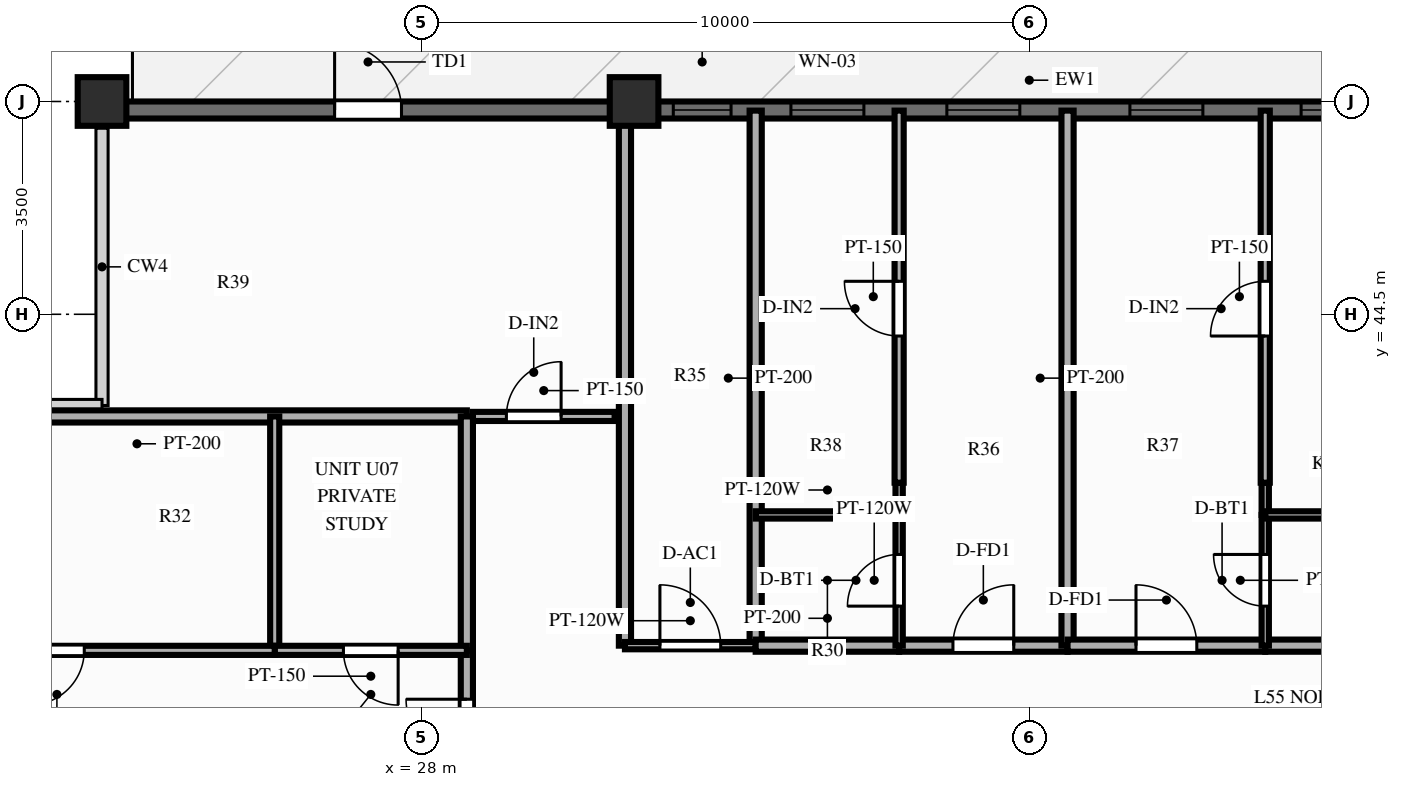
"""IFC4 building model, lengths in metres.
Left out: names, types, materials, properties, quantities, classifications, styles, units other than length and angle.
Written with IfcOpenShell. Run it as: python <this file> out.ifc"""

import sys

from ifc_helpers import new_model, si_unit, direction, frame, frame_2d, origin, origin_2d, place, context, subcontext, project, spatial, rectangle, extrude, source, transform, mapped, element, fill, save


model = new_model("IFC4")
c1 = context("Model", 3, precision=1e-05, world=origin(), true_north=direction((0.0, 1.0)))
c2 = subcontext(c1, "Body", "Model", "MODEL_VIEW")
j1 = project(units=[si_unit("LENGTHUNIT", "METRE"), si_unit("PLANEANGLEUNIT", "RADIAN")], contexts=[c1])
p1 = place(None, origin())
s1 = spatial("IfcSite", under=j1, at=p1, CompositionType="ELEMENT")
p2 = place(p1, origin())
s2 = spatial("IfcBuilding", under=s1, at=p2, CompositionType="ELEMENT")
p3 = place(p2, frame((0.0, 0.0, 176.8)))
s3 = spatial("IfcBuildingStorey", under=s2, at=p3, CompositionType="ELEMENT", Elevation=176.8)
m1 = source(origin(), c2, "Body", "SweptSolid", [
    extrude(rectangle(XDim=0.8, YDim=0.8, at=origin_2d()), origin(), (0.0, 0.0, 1.0), 3.0),
])
for number, where, z_axis, x_axis in (
    (1, (31.5, 48.0, 0.0), (0.0, 0.0, 1.0), (1.0, 0.0, 0.0)),
    (2, (22.75, 48.0, 0.0), (0.0, 0.0, 1.0), (1.0, 0.0, 0.0)),
):
    element("IfcColumn", number, at=place(p3, frame(where, z_axis=z_axis, x_axis=x_axis)), inside=s3, PredefinedType="COLUMN", context=c2, shape_type="MappedRepresentation", body=[
        mapped(m1, transform((0.0, 0.0, 0.0), scale=1.0)),
    ])
p4 = place(p3, frame((22.75, 47.86, 0.0), z_axis=(0.0, 0.0, 1.0), x_axis=(1.0, 0.0, 0.0)))
e3 = element("IfcWall", 3, at=p4, inside=s3, PredefinedType="SOLIDWALL", context=c2, shape_type="SweptSolid", body=[
    extrude(rectangle(XDim=30.5, YDim=0.28, at=frame_2d((15.25, 0.0))), origin(), (0.0, 0.0, 1.0), 2.28),
])
p5 = place(p4, frame((3.825, 0.0, 0.0)))
e4 = element("IfcOpeningElement", 4, at=p5, cuts=e3, PredefinedType="OPENING", context=c2, shape_type="SweptSolid", body=[
    extrude(rectangle(XDim=1.1, YDim=2.15, at=frame_2d((0.55, 1.075))), frame((0.0, 0.152, 0.0), z_axis=(0.0, -1.0, 0.0), x_axis=(1.0, 0.0, 0.0)), (0.0, 0.0, 1.0), 0.304),
])
p6 = place(p4, frame((9.395, 0.0, 0.25)))
e5 = element("IfcOpeningElement", 5, at=p6, cuts=e3, PredefinedType="OPENING", context=c2, shape_type="SweptSolid", body=[
    extrude(rectangle(XDim=0.95, YDim=1.5, at=frame_2d((0.475, 0.75))), frame((0.0, 0.152, 0.0), z_axis=(0.0, -1.0, 0.0), x_axis=(1.0, 0.0, 0.0)), (0.0, 0.0, 1.0), 0.304),
])
p7 = place(p4, frame((11.33, 0.0, 0.25)))
e6 = element("IfcOpeningElement", 6, at=p7, cuts=e3, PredefinedType="OPENING", context=c2, shape_type="SweptSolid", body=[
    extrude(rectangle(XDim=1.2, YDim=1.5, at=frame_2d((0.6, 0.75))), frame((0.0, 0.152, 0.0), z_axis=(0.0, -1.0, 0.0), x_axis=(1.0, 0.0, 0.0)), (0.0, 0.0, 1.0), 0.304),
])
p8 = place(p4, frame((13.894, 0.0, 0.25)))
e7 = element("IfcOpeningElement", 7, at=p8, cuts=e3, PredefinedType="OPENING", context=c2, shape_type="SweptSolid", body=[
    extrude(rectangle(XDim=1.2, YDim=1.5, at=frame_2d((0.6, 0.75))), frame((0.0, 0.152, 0.0), z_axis=(0.0, -1.0, 0.0), x_axis=(1.0, 0.0, 0.0)), (0.0, 0.0, 1.0), 0.304),
])
p9 = place(p4, frame((16.905, 0.0, 0.25)))
e8 = element("IfcOpeningElement", 8, at=p9, cuts=e3, PredefinedType="OPENING", context=c2, shape_type="SweptSolid", body=[
    extrude(rectangle(XDim=1.2, YDim=1.5, at=frame_2d((0.6, 0.75))), frame((0.0, 0.152, 0.0), z_axis=(0.0, -1.0, 0.0), x_axis=(1.0, 0.0, 0.0)), (0.0, 0.0, 1.0), 0.304),
])
p10 = place(p4, frame((19.72, 0.0, 0.25)))
e9 = element("IfcOpeningElement", 9, at=p10, cuts=e3, PredefinedType="OPENING", context=c2, shape_type="SweptSolid", body=[
    extrude(rectangle(XDim=1.2, YDim=1.5, at=frame_2d((0.6, 0.75))), frame((0.0, 0.152, 0.0), z_axis=(0.0, -1.0, 0.0), x_axis=(1.0, 0.0, 0.0)), (0.0, 0.0, 1.0), 0.304),
])
p11 = place(p4, frame((25.525, 0.0, 0.25)))
e10 = element("IfcOpeningElement", 10, at=p11, cuts=e3, PredefinedType="OPENING", context=c2, shape_type="SweptSolid", body=[
    extrude(rectangle(XDim=1.2, YDim=1.5, at=frame_2d((0.6, 0.75))), frame((0.0, 0.152, 0.0), z_axis=(0.0, -1.0, 0.0), x_axis=(1.0, 0.0, 0.0)), (0.0, 0.0, 1.0), 0.304),
])
p12 = place(p3, frame((28.85, 42.82, 0.0), z_axis=(0.0, 0.0, 1.0), x_axis=(1.0, 0.0, 0.0)))
e11 = element("IfcWall", 11, at=p12, inside=s3, PredefinedType="PARTITIONING", context=c2, shape_type="SweptSolid", body=[
    extrude(rectangle(XDim=2.33, YDim=0.15, at=frame_2d((1.165, 0.0))), origin(), (0.0, 0.0, 1.0), 2.79),
])
p13 = place(p12, frame((0.55, 0.0, 0.0)))
e12 = element("IfcOpeningElement", 12, at=p13, cuts=e11, PredefinedType="OPENING", context=c2, shape_type="SweptSolid", body=[
    extrude(rectangle(XDim=0.9, YDim=2.1, at=frame_2d((0.45, 1.05))), frame((0.0, 0.087, 0.0), z_axis=(0.0, -1.0, 0.0), x_axis=(1.0, 0.0, 0.0)), (0.0, 0.0, 1.0), 0.174),
])
p14 = place(p3, frame((31.35, 39.05, 0.0), z_axis=(0.0, 0.0, 1.0), x_axis=(0.0, 1.0, 0.0)))
e13 = element("IfcWall", 13, at=p14, inside=s3, PredefinedType="PARTITIONING", context=c2, shape_type="SweptSolid", body=[
    extrude(rectangle(XDim=8.8, YDim=0.2, at=frame_2d((4.4, 0.0))), origin(), (0.0, 0.0, 1.0), 2.39),
])
p15 = place(p3, frame((33.5, 39.05, 0.0), z_axis=(0.0, 0.0, 1.0), x_axis=(0.0, 1.0, 0.0)))
e14 = element("IfcWall", 14, at=p15, inside=s3, PredefinedType="PARTITIONING", context=c2, shape_type="SweptSolid", body=[
    extrude(rectangle(XDim=8.8, YDim=0.2, at=frame_2d((4.4, 0.0))), origin(), (0.0, 0.0, 1.0), 2.79),
])
p16 = place(p3, frame((31.35, 39.05, 0.0), z_axis=(0.0, 0.0, 1.0), x_axis=(1.0, 0.0, 0.0)))
e15 = element("IfcWall", 15, at=p16, inside=s3, PredefinedType="PARTITIONING", context=c2, shape_type="SweptSolid", body=[
    extrude(rectangle(XDim=2.15, YDim=0.12, at=frame_2d((1.075, 0.0))), origin(), (0.0, 0.0, 1.0), 2.79),
])
p17 = place(p16, frame((0.575, 0.0, 0.0)))
e16 = element("IfcOpeningElement", 16, at=p17, cuts=e15, PredefinedType="OPENING", context=c2, shape_type="SweptSolid", body=[
    extrude(rectangle(XDim=1.0, YDim=2.1, at=frame_2d((0.5, 1.05))), frame((0.0, 0.072, 0.0), z_axis=(0.0, -1.0, 0.0), x_axis=(1.0, 0.0, 0.0)), (0.0, 0.0, 1.0), 0.144),
])
p18 = place(p3, frame((33.5, 39.05, 0.0), z_axis=(0.0, 0.0, 1.0), x_axis=(1.0, 0.0, 0.0)))
e17 = element("IfcWall", 17, at=p18, inside=s3, PredefinedType="PARTITIONING", context=c2, shape_type="SweptSolid", body=[
    extrude(rectangle(XDim=2.359, YDim=0.2, at=frame_2d((1.18, 0.0))), origin(), (0.0, 0.0, 1.0), 2.79),
])
p19 = place(p3, frame((35.859, 39.05, 0.0), z_axis=(0.0, 0.0, 1.0), x_axis=(1.0, 0.0, 0.0)))
e18 = element("IfcWall", 18, at=p19, inside=s3, PredefinedType="PARTITIONING", context=c2, shape_type="SweptSolid", body=[
    extrude(rectangle(XDim=2.77, YDim=0.2, at=frame_2d((1.385, 0.0))), origin(), (0.0, 0.0, 1.0), 2.79),
])
p20 = place(p19, frame((0.885, 0.0, 0.0)))
e19 = element("IfcOpeningElement", 19, at=p20, cuts=e18, PredefinedType="OPENING", context=c2, shape_type="SweptSolid", body=[
    extrude(rectangle(XDim=1.0, YDim=2.15, at=frame_2d((0.5, 1.075))), frame((0.0, 0.112, 0.0), z_axis=(0.0, -1.0, 0.0), x_axis=(1.0, 0.0, 0.0)), (0.0, 0.0, 1.0), 0.224),
])
p21 = place(p3, frame((35.859, 39.05, 0.0), z_axis=(0.0, 0.0, 1.0), x_axis=(0.0, 1.0, 0.0)))
e20 = element("IfcWall", 20, at=p21, inside=s3, PredefinedType="PARTITIONING", context=c2, shape_type="SweptSolid", body=[
    extrude(rectangle(XDim=2.15, YDim=0.12, at=frame_2d((1.075, 0.0))), origin(), (0.0, 0.0, 1.0), 2.79),
])
p22 = place(p21, frame((0.65, 0.0, 0.0)))
e21 = element("IfcOpeningElement", 21, at=p22, cuts=e20, PredefinedType="OPENING", context=c2, shape_type="SweptSolid", body=[
    extrude(rectangle(XDim=0.85, YDim=2.05, at=frame_2d((0.425, 1.025))), frame((0.0, 0.072, 0.0), z_axis=(0.0, -1.0, 0.0), x_axis=(1.0, 0.0, 0.0)), (0.0, 0.0, 1.0), 0.144),
])
p23 = place(p3, frame((35.859, 41.2, 0.0), z_axis=(0.0, 0.0, 1.0), x_axis=(0.0, 1.0, 0.0)))
e22 = element("IfcWall", 22, at=p23, inside=s3, PredefinedType="PARTITIONING", context=c2, shape_type="SweptSolid", body=[
    extrude(rectangle(XDim=0.53, YDim=0.12, at=frame_2d((0.265, 0.0))), origin(), (0.0, 0.0, 1.0), 2.79),
])
p24 = place(p3, frame((33.5, 41.2, 0.0), z_axis=(0.0, 0.0, 1.0), x_axis=(1.0, 0.0, 0.0)))
e23 = element("IfcWall", 23, at=p24, inside=s3, PredefinedType="PARTITIONING", context=c2, shape_type="SweptSolid", body=[
    extrude(rectangle(XDim=2.359, YDim=0.12, at=frame_2d((1.18, 0.0))), origin(), (0.0, 0.0, 1.0), 2.79),
])
p25 = place(p3, frame((35.859, 41.73, 0.0), z_axis=(0.0, 0.0, 1.0), x_axis=(0.0, 1.0, 0.0)))
e24 = element("IfcWall", 24, at=p25, inside=s3, PredefinedType="PARTITIONING", context=c2, shape_type="SweptSolid", body=[
    extrude(rectangle(XDim=6.12, YDim=0.15, at=frame_2d((3.06, 0.0))), origin(), (0.0, 0.0, 1.0), 2.79),
])
p26 = place(p25, frame((2.413, 0.0, 0.0)))
e25 = element("IfcOpeningElement", 25, at=p26, cuts=e24, PredefinedType="OPENING", context=c2, shape_type="SweptSolid", body=[
    extrude(rectangle(XDim=0.9, YDim=2.1, at=frame_2d((0.45, 1.05))), frame((0.0, 0.087, 0.0), z_axis=(0.0, -1.0, 0.0), x_axis=(1.0, 0.0, 0.0)), (0.0, 0.0, 1.0), 0.174),
])
p27 = place(p3, frame((38.629, 39.05, 0.0), z_axis=(0.0, 0.0, 1.0), x_axis=(0.0, 1.0, 0.0)))
e26 = element("IfcWall", 26, at=p27, inside=s3, PredefinedType="PARTITIONING", context=c2, shape_type="SweptSolid", body=[
    extrude(rectangle(XDim=8.8, YDim=0.2, at=frame_2d((4.4, 0.0))), origin(), (0.0, 0.0, 1.0), 2.79),
])
p28 = place(p3, frame((38.629, 39.05, 0.0), z_axis=(0.0, 0.0, 1.0), x_axis=(1.0, 0.0, 0.0)))
e27 = element("IfcWall", 27, at=p28, inside=s3, PredefinedType="PARTITIONING", context=c2, shape_type="SweptSolid", body=[
    extrude(rectangle(XDim=3.251, YDim=0.2, at=frame_2d((1.626, 0.0))), origin(), (0.0, 0.0, 1.0), 2.79),
])
p29 = place(p28, frame((1.126, 0.0, 0.0)))
e28 = element("IfcOpeningElement", 28, at=p29, cuts=e27, PredefinedType="OPENING", context=c2, shape_type="SweptSolid", body=[
    extrude(rectangle(XDim=1.0, YDim=2.15, at=frame_2d((0.5, 1.075))), frame((0.0, 0.112, 0.0), z_axis=(0.0, -1.0, 0.0), x_axis=(1.0, 0.0, 0.0)), (0.0, 0.0, 1.0), 0.224),
])
p30 = place(p3, frame((41.88, 39.05, 0.0), z_axis=(0.0, 0.0, 1.0), x_axis=(1.0, 0.0, 0.0)))
e29 = element("IfcWall", 29, at=p30, inside=s3, PredefinedType="PARTITIONING", context=c2, shape_type="SweptSolid", body=[
    extrude(rectangle(XDim=2.77, YDim=0.2, at=frame_2d((1.385, 0.0))), origin(), (0.0, 0.0, 1.0), 2.79),
])
p31 = place(p3, frame((41.88, 39.05, 0.0), z_axis=(0.0, 0.0, 1.0), x_axis=(0.0, 1.0, 0.0)))
e30 = element("IfcWall", 30, at=p31, inside=s3, PredefinedType="PARTITIONING", context=c2, shape_type="SweptSolid", body=[
    extrude(rectangle(XDim=2.15, YDim=0.12, at=frame_2d((1.075, 0.0))), origin(), (0.0, 0.0, 1.0), 2.79),
])
p32 = place(p31, frame((0.65, 0.0, 0.0)))
e31 = element("IfcOpeningElement", 31, at=p32, cuts=e30, PredefinedType="OPENING", context=c2, shape_type="SweptSolid", body=[
    extrude(rectangle(XDim=0.85, YDim=2.05, at=frame_2d((0.425, 1.025))), frame((0.0, 0.072, 0.0), z_axis=(0.0, -1.0, 0.0), x_axis=(1.0, 0.0, 0.0)), (0.0, 0.0, 1.0), 0.144),
])
p33 = place(p3, frame((41.88, 41.2, 0.0), z_axis=(0.0, 0.0, 1.0), x_axis=(0.0, 1.0, 0.0)))
e32 = element("IfcWall", 32, at=p33, inside=s3, PredefinedType="PARTITIONING", context=c2, shape_type="SweptSolid", body=[
    extrude(rectangle(XDim=0.53, YDim=0.12, at=frame_2d((0.265, 0.0))), origin(), (0.0, 0.0, 1.0), 2.79),
])
p34 = place(p3, frame((41.88, 41.2, 0.0), z_axis=(0.0, 0.0, 1.0), x_axis=(1.0, 0.0, 0.0)))
e33 = element("IfcWall", 33, at=p34, inside=s3, PredefinedType="PARTITIONING", context=c2, shape_type="SweptSolid", body=[
    extrude(rectangle(XDim=2.77, YDim=0.12, at=frame_2d((1.385, 0.0))), origin(), (0.0, 0.0, 1.0), 2.79),
])
p35 = place(p3, frame((41.88, 41.73, 0.0), z_axis=(0.0, 0.0, 1.0), x_axis=(0.0, 1.0, 0.0)))
e34 = element("IfcWall", 34, at=p35, inside=s3, PredefinedType="PARTITIONING", context=c2, shape_type="SweptSolid", body=[
    extrude(rectangle(XDim=6.12, YDim=0.15, at=frame_2d((3.06, 0.0))), origin(), (0.0, 0.0, 1.0), 2.79),
])
p36 = place(p35, frame((2.413, 0.0, 0.0)))
e35 = element("IfcOpeningElement", 35, at=p36, cuts=e34, PredefinedType="OPENING", context=c2, shape_type="SweptSolid", body=[
    extrude(rectangle(XDim=0.9, YDim=2.1, at=frame_2d((0.45, 1.05))), frame((0.0, 0.087, 0.0), z_axis=(0.0, -1.0, 0.0), x_axis=(1.0, 0.0, 0.0)), (0.0, 0.0, 1.0), 0.174),
])
p37 = place(p3, frame((28.75, 42.82, 0.0), z_axis=(0.0, 0.0, 1.0), x_axis=(-1.0, 0.0, 0.0)))
e36 = element("IfcWall", 36, at=p37, inside=s3, PredefinedType="PARTITIONING", context=c2, shape_type="SweptSolid", body=[
    extrude(rectangle(XDim=10.85, YDim=0.2, at=frame_2d((5.425, 0.0))), origin(), (0.0, 0.0, 1.0), 2.79),
])
p38 = place(p3, frame((28.75, 35.445, 0.0), z_axis=(0.0, 0.0, 1.0), x_axis=(0.0, 1.0, 0.0)))
e37 = element("IfcWall", 37, at=p38, inside=s3, PredefinedType="PARTITIONING", context=c2, shape_type="SweptSolid", body=[
    extrude(rectangle(XDim=3.527, YDim=0.2, at=frame_2d((1.764, 0.0))), origin(), (0.0, 0.0, 1.0), 2.79),
])
p39 = place(p38, frame((1.724, 0.0, 0.0)))
e38 = element("IfcOpeningElement", 38, at=p39, cuts=e37, PredefinedType="OPENING", context=c2, shape_type="SweptSolid", body=[
    extrude(rectangle(XDim=1.0, YDim=2.15, at=frame_2d((0.5, 1.075))), frame((0.0, 0.112, 0.0), z_axis=(0.0, -1.0, 0.0), x_axis=(1.0, 0.0, 0.0)), (0.0, 0.0, 1.0), 0.224),
])
p40 = place(p3, frame((28.75, 38.973, 0.0), z_axis=(0.0, 0.0, 1.0), x_axis=(0.0, 1.0, 0.0)))
e39 = element("IfcWall", 39, at=p40, inside=s3, PredefinedType="PARTITIONING", context=c2, shape_type="SweptSolid", body=[
    extrude(rectangle(XDim=3.847, YDim=0.2, at=frame_2d((1.924, 0.0))), origin(), (0.0, 0.0, 1.0), 2.79),
])
p41 = place(p3, frame((25.59, 38.973, 0.0), z_axis=(0.0, 0.0, 1.0), x_axis=(0.0, 1.0, 0.0)))
e40 = element("IfcWall", 40, at=p41, inside=s3, PredefinedType="PARTITIONING", context=c2, shape_type="SweptSolid", body=[
    extrude(rectangle(XDim=3.847, YDim=0.15, at=frame_2d((1.924, 0.0))), origin(), (0.0, 0.0, 1.0), 2.79),
])
p42 = place(p3, frame((28.75, 38.973, 0.0), z_axis=(0.0, 0.0, 1.0), x_axis=(-1.0, 0.0, 0.0)))
e41 = element("IfcWall", 41, at=p42, inside=s3, PredefinedType="PARTITIONING", context=c2, shape_type="SweptSolid", body=[
    extrude(rectangle(XDim=3.16, YDim=0.15, at=frame_2d((1.58, 0.0))), origin(), (0.0, 0.0, 1.0), 2.79),
])
p43 = place(p42, frame((1.13, 0.0, 0.0)))
e42 = element("IfcOpeningElement", 42, at=p43, cuts=e41, PredefinedType="OPENING", context=c2, shape_type="SweptSolid", body=[
    extrude(rectangle(XDim=0.9, YDim=2.1, at=frame_2d((0.45, 1.05))), frame((0.0, 0.087, 0.0), z_axis=(0.0, -1.0, 0.0), x_axis=(1.0, 0.0, 0.0)), (0.0, 0.0, 1.0), 0.174),
])
p44 = place(p3, frame((25.59, 38.973, 0.0), z_axis=(0.0, 0.0, 1.0), x_axis=(-1.0, 0.0, 0.0)))
e43 = element("IfcWall", 43, at=p44, inside=s3, PredefinedType="PARTITIONING", context=c2, shape_type="SweptSolid", body=[
    extrude(rectangle(XDim=7.69, YDim=0.15, at=frame_2d((3.845, 0.0))), origin(), (0.0, 0.0, 1.0), 2.79),
])
p45 = place(p44, frame((3.132, 0.0, 0.0)))
e44 = element("IfcOpeningElement", 44, at=p45, cuts=e43, PredefinedType="OPENING", context=c2, shape_type="SweptSolid", body=[
    extrude(rectangle(XDim=0.9, YDim=2.1, at=frame_2d((0.45, 1.05))), frame((0.0, 0.087, 0.0), z_axis=(0.0, -1.0, 0.0), x_axis=(1.0, 0.0, 0.0)), (0.0, 0.0, 1.0), 0.174),
])
m2 = source(origin(), c2, "Body", "SweptSolid", [
    extrude(rectangle(XDim=1.1, YDim=2.15, at=frame_2d((0.55, 1.075))), frame((0.0, 0.025, 0.0), z_axis=(0.0, -1.0, 0.0), x_axis=(1.0, 0.0, 0.0)), (0.0, 0.0, 1.0), 0.05),
])
p46 = place(p5, origin())
e45 = element("IfcDoor", 45, at=p46, inside=s3, OperationType="SINGLE_SWING_LEFT", PredefinedType="DOOR", context=c2, shape_type="MappedRepresentation", body=[
    mapped(m2, transform((0.0, 0.0, 0.0), scale=1.0)),
])
fill(e4, e45)
m3 = source(origin(), c2, "Body", "SweptSolid", [
    extrude(rectangle(XDim=0.95, YDim=1.5, at=frame_2d((0.475, 0.75))), frame((0.0, 0.03, 0.0), z_axis=(0.0, -1.0, 0.0), x_axis=(1.0, 0.0, 0.0)), (0.0, 0.0, 1.0), 0.06),
])
p47 = place(p6, origin())
e46 = element("IfcWindow", 46, at=p47, inside=s3, PartitioningType="SINGLE_PANEL", PredefinedType="WINDOW", context=c2, shape_type="MappedRepresentation", body=[
    mapped(m3, transform((0.0, 0.0, 0.0), scale=1.0)),
])
fill(e5, e46)
m4 = source(origin(), c2, "Body", "SweptSolid", [
    extrude(rectangle(XDim=1.2, YDim=1.5, at=frame_2d((0.6, 0.75))), frame((0.0, 0.03, 0.0), z_axis=(0.0, -1.0, 0.0), x_axis=(1.0, 0.0, 0.0)), (0.0, 0.0, 1.0), 0.06),
])
p48 = place(p7, origin())
e47 = element("IfcWindow", 47, at=p48, inside=s3, PartitioningType="SINGLE_PANEL", PredefinedType="WINDOW", context=c2, shape_type="MappedRepresentation", body=[
    mapped(m4, transform((0.0, 0.0, 0.0), scale=1.0)),
])
fill(e6, e47)
p49 = place(p8, origin())
e48 = element("IfcWindow", 48, at=p49, inside=s3, PartitioningType="SINGLE_PANEL", PredefinedType="WINDOW", context=c2, shape_type="MappedRepresentation", body=[
    mapped(m4, transform((0.0, 0.0, 0.0), scale=1.0)),
])
fill(e7, e48)
p50 = place(p9, origin())
e49 = element("IfcWindow", 49, at=p50, inside=s3, PartitioningType="SINGLE_PANEL", PredefinedType="WINDOW", context=c2, shape_type="MappedRepresentation", body=[
    mapped(m4, transform((0.0, 0.0, 0.0), scale=1.0)),
])
fill(e8, e49)
p51 = place(p10, origin())
e50 = element("IfcWindow", 50, at=p51, inside=s3, PartitioningType="SINGLE_PANEL", PredefinedType="WINDOW", context=c2, shape_type="MappedRepresentation", body=[
    mapped(m4, transform((0.0, 0.0, 0.0), scale=1.0)),
])
fill(e9, e50)
m5 = source(origin(), c2, "Body", "SweptSolid", [
    extrude(rectangle(XDim=0.9, YDim=2.1, at=frame_2d((0.45, 1.05))), frame((0.0, 0.025, 0.0), z_axis=(0.0, -1.0, 0.0), x_axis=(1.0, 0.0, 0.0)), (0.0, 0.0, 1.0), 0.05),
])
p52 = place(p13, origin())
e51 = element("IfcDoor", 51, at=p52, inside=s3, OperationType="SINGLE_SWING_RIGHT", PredefinedType="DOOR", context=c2, shape_type="MappedRepresentation", body=[
    mapped(m5, transform((0.0, 0.0, 0.0), scale=1.0)),
])
fill(e12, e51)
m6 = source(origin(), c2, "Body", "SweptSolid", [
    extrude(rectangle(XDim=1.0, YDim=2.1, at=frame_2d((0.5, 1.05))), frame((0.0, 0.025, 0.0), z_axis=(0.0, -1.0, 0.0), x_axis=(1.0, 0.0, 0.0)), (0.0, 0.0, 1.0), 0.05),
])
p53 = place(p17, origin())
e52 = element("IfcDoor", 52, at=p53, inside=s3, OperationType="SINGLE_SWING_LEFT", PredefinedType="DOOR", context=c2, shape_type="MappedRepresentation", body=[
    mapped(m6, transform((0.0, 0.0, 0.0), scale=1.0)),
])
fill(e16, e52)
m7 = source(origin(), c2, "Body", "SweptSolid", [
    extrude(rectangle(XDim=1.0, YDim=2.15, at=frame_2d((0.5, 1.075))), frame((0.0, 0.025, 0.0), z_axis=(0.0, -1.0, 0.0), x_axis=(1.0, 0.0, 0.0)), (0.0, 0.0, 1.0), 0.05),
])
p54 = place(p20, origin())
e53 = element("IfcDoor", 53, at=p54, inside=s3, OperationType="SINGLE_SWING_RIGHT", PredefinedType="DOOR", context=c2, shape_type="MappedRepresentation", body=[
    mapped(m7, transform((0.0, 0.0, 0.0), scale=1.0)),
])
fill(e19, e53)
m8 = source(origin(), c2, "Body", "SweptSolid", [
    extrude(rectangle(XDim=0.85, YDim=2.05, at=frame_2d((0.425, 1.025))), frame((0.0, 0.025, 0.0), z_axis=(0.0, -1.0, 0.0), x_axis=(1.0, 0.0, 0.0)), (0.0, 0.0, 1.0), 0.05),
])
p55 = place(p22, origin())
e54 = element("IfcDoor", 54, at=p55, inside=s3, OperationType="SINGLE_SWING_LEFT", PredefinedType="DOOR", context=c2, shape_type="MappedRepresentation", body=[
    mapped(m8, transform((0.0, 0.0, 0.0), scale=1.0)),
])
fill(e21, e54)
p56 = place(p26, origin())
e55 = element("IfcDoor", 55, at=p56, inside=s3, OperationType="SINGLE_SWING_RIGHT", PredefinedType="DOOR", context=c2, shape_type="MappedRepresentation", body=[
    mapped(m5, transform((0.0, 0.0, 0.0), scale=1.0)),
])
fill(e25, e55)
p57 = place(p29, origin())
e56 = element("IfcDoor", 56, at=p57, inside=s3, OperationType="SINGLE_SWING_LEFT", PredefinedType="DOOR", context=c2, shape_type="MappedRepresentation", body=[
    mapped(m7, transform((0.0, 0.0, 0.0), scale=1.0)),
])
fill(e28, e56)
p58 = place(p32, origin())
e57 = element("IfcDoor", 57, at=p58, inside=s3, OperationType="SINGLE_SWING_RIGHT", PredefinedType="DOOR", context=c2, shape_type="MappedRepresentation", body=[
    mapped(m8, transform((0.0, 0.0, 0.0), scale=1.0)),
])
fill(e31, e57)
p59 = place(p36, origin())
e58 = element("IfcDoor", 58, at=p59, inside=s3, OperationType="SINGLE_SWING_LEFT", PredefinedType="DOOR", context=c2, shape_type="MappedRepresentation", body=[
    mapped(m5, transform((0.0, 0.0, 0.0), scale=1.0)),
])
fill(e35, e58)
p60 = place(p39, origin())
e59 = element("IfcDoor", 59, at=p60, inside=s3, OperationType="SINGLE_SWING_RIGHT", PredefinedType="DOOR", context=c2, shape_type="MappedRepresentation", body=[
    mapped(m7, transform((0.0, 0.0, 0.0), scale=1.0)),
])
fill(e38, e59)
p61 = place(p43, origin())
e60 = element("IfcDoor", 60, at=p61, inside=s3, OperationType="SINGLE_SWING_LEFT", PredefinedType="DOOR", context=c2, shape_type="MappedRepresentation", body=[
    mapped(m5, transform((0.0, 0.0, 0.0), scale=1.0)),
])
fill(e42, e60)
p62 = place(p45, origin())
e61 = element("IfcDoor", 61, at=p62, inside=s3, OperationType="SINGLE_SWING_RIGHT", PredefinedType="DOOR", context=c2, shape_type="MappedRepresentation", body=[
    mapped(m5, transform((0.0, 0.0, 0.0), scale=1.0)),
])
fill(e44, e61)
save(model, sys.argv[1])
